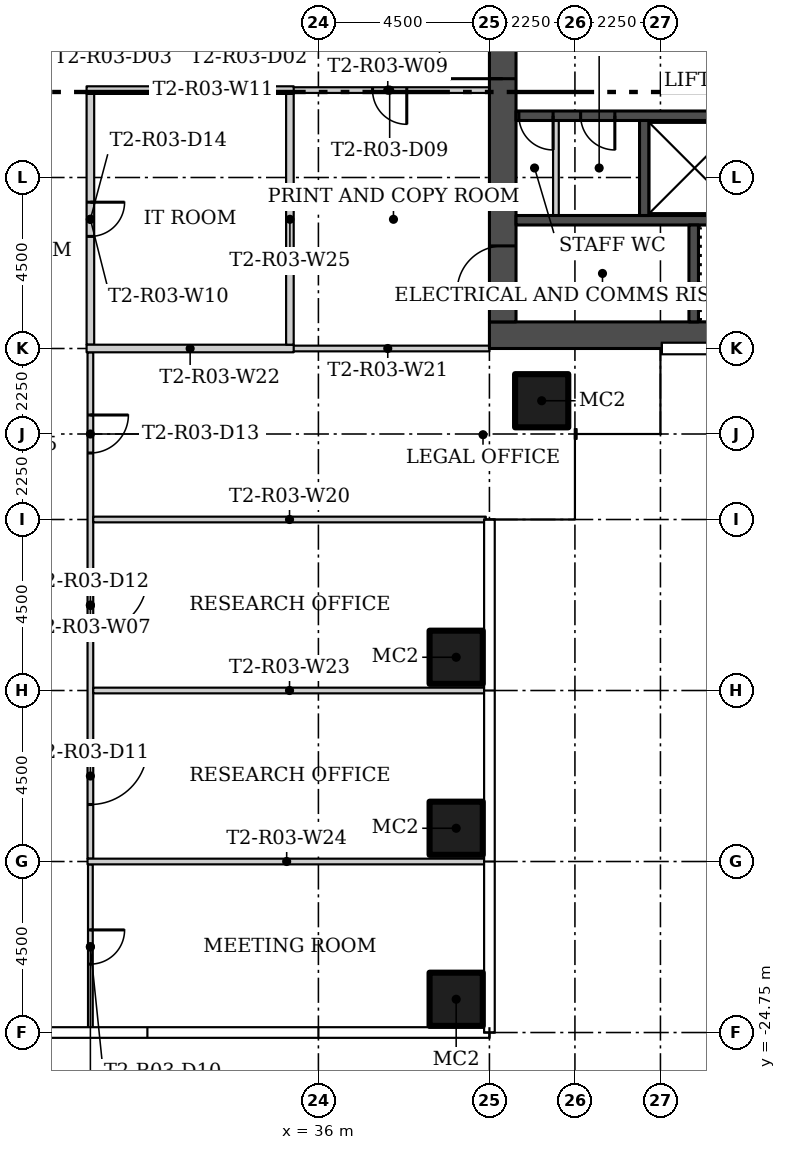
"""IFC4 building model, lengths in metres.
Left out: names, types, materials, properties, quantities, classifications, styles, units other than length and angle.
Written with IfcOpenShell. Run it as: python <this file> out.ifc"""

import sys

from ifc_helpers import new_model, si_unit, direction, frame, frame_2d, origin, origin_2d, place, context, subcontext, project, spatial, rectangle, hollow_rectangle, extrude, element, fill, save


model = new_model("IFC4")
c1 = context("Model", 3, precision=1e-05, world=origin(), true_north=direction((0.0, 1.0)))
c2 = subcontext(c1, "Body", "Model", "MODEL_VIEW")
j1 = project(units=[si_unit("LENGTHUNIT", "METRE"), si_unit("PLANEANGLEUNIT", "RADIAN")], contexts=[c1])
p1 = place(None, origin())
s1 = spatial("IfcSite", under=j1, at=p1, CompositionType="ELEMENT")
p2 = place(p1, origin())
s2 = spatial("IfcBuilding", under=s1, at=p2, CompositionType="ELEMENT")
p3 = place(p2, frame((0.0, 0.0, 42.0)))
s3 = spatial("IfcBuildingStorey", under=s2, at=p3, CompositionType="ELEMENT", Elevation=42.0)
for number, where in (
    (1, (41.875, -8.125, 0.0)),
    (2, (39.625, -14.875, 0.0)),
    (3, (39.625, -19.375, 0.0)),
    (4, (39.625, -23.875, 0.0)),
):
    element("IfcColumn", number, at=place(p3, frame(where)), inside=s3, PredefinedType="COLUMN", context=c2, shape_type="SweptSolid", body=[
        extrude(hollow_rectangle(XDim=1.4, YDim=1.4, WallThickness=0.05, at=origin_2d()), origin(), (0.0, 0.0, 1.0), 3.55),
    ])
p4 = place(p3, frame((30.0, -6.85, 0.0), z_axis=(0.0, 0.0, 1.0), x_axis=(0.0, -1.0, 0.0)))
e5 = element("IfcWall", 5, at=p4, inside=s3, PredefinedType="PARTITIONING", context=c2, shape_type="SweptSolid", body=[
    extrude(rectangle(XDim=13.325, YDim=0.15, at=frame_2d((6.663, 0.0))), origin(), (0.0, 0.0, 1.0), 3.55),
])
p5 = place(p4, frame((10.4, 0.0, 0.0)))
e6 = element("IfcOpeningElement", 6, at=p5, cuts=e5, PredefinedType="OPENING", context=c2, shape_type="SweptSolid", body=[
    extrude(rectangle(XDim=1.5, YDim=2.1, at=frame_2d((0.75, 1.05))), frame((0.0, 0.085, 0.0), z_axis=(0.0, -1.0, 0.0), x_axis=(1.0, 0.0, 0.0)), (0.0, 0.0, 1.0), 0.17),
])
p6 = place(p4, frame((5.9, 0.0, 0.0)))
e7 = element("IfcOpeningElement", 7, at=p6, cuts=e5, PredefinedType="OPENING", context=c2, shape_type="SweptSolid", body=[
    extrude(rectangle(XDim=1.5, YDim=2.1, at=frame_2d((0.75, 1.05))), frame((0.0, 0.085, 0.0), z_axis=(0.0, -1.0, 0.0), x_axis=(1.0, 0.0, 0.0)), (0.0, 0.0, 1.0), 0.17),
])
p7 = place(p4, frame((1.65, 0.0, 0.0)))
e8 = element("IfcOpeningElement", 8, at=p7, cuts=e5, PredefinedType="OPENING", context=c2, shape_type="SweptSolid", body=[
    extrude(rectangle(XDim=1.0, YDim=2.4, at=frame_2d((0.5, 1.2))), frame((0.0, 0.085, 0.0), z_axis=(0.0, -1.0, 0.0), x_axis=(1.0, 0.0, 0.0)), (0.0, 0.0, 1.0), 0.17),
])
p8 = place(p3, frame((30.0, -20.325, 0.0), z_axis=(0.0, 0.0, 1.0), x_axis=(0.0, -1.0, 0.0)))
e9 = element("IfcWall", 9, at=p8, inside=s3, PredefinedType="PARTITIONING", context=c2, shape_type="SweptSolid", body=[
    extrude(rectangle(XDim=4.33, YDim=0.125, at=frame_2d((2.165, 0.0))), origin(), (0.0, 0.0, 1.0), 3.55),
])
p9 = place(p8, frame((1.725, 0.0, 0.0)))
e10 = element("IfcOpeningElement", 10, at=p9, cuts=e9, PredefinedType="OPENING", context=c2, shape_type="SweptSolid", body=[
    extrude(rectangle(XDim=0.9, YDim=2.1, at=frame_2d((0.45, 1.05))), frame((0.0, 0.073, 0.0), z_axis=(0.0, -1.0, 0.0), x_axis=(1.0, 0.0, 0.0)), (0.0, 0.0, 1.0), 0.145),
])
p10 = place(p3, frame((40.5, 0.05, 0.0), z_axis=(0.0, 0.0, 1.0), x_axis=(-1.0, 0.0, 0.0)))
e11 = element("IfcWall", 11, at=p10, inside=s3, PredefinedType="PARTITIONING", context=c2, shape_type="SweptSolid", body=[
    extrude(rectangle(XDim=5.35, YDim=0.15, at=frame_2d((2.675, 0.0))), origin(), (0.0, 0.0, 1.0), 3.55),
])
p11 = place(p10, frame((2.175, 0.0, 0.0)))
e12 = element("IfcOpeningElement", 12, at=p11, cuts=e11, PredefinedType="OPENING", context=c2, shape_type="SweptSolid", body=[
    extrude(rectangle(XDim=0.9, YDim=2.1, at=frame_2d((0.45, 1.05))), frame((0.0, 0.085, 0.0), z_axis=(0.0, -1.0, 0.0), x_axis=(1.0, 0.0, 0.0)), (0.0, 0.0, 1.0), 0.17),
])
p12 = place(p3, frame((30.0, -0.05, 0.0), z_axis=(0.0, 0.0, 1.0), x_axis=(0.0, -1.0, 0.0)))
e13 = element("IfcWall", 13, at=p12, inside=s3, PredefinedType="PARTITIONING", context=c2, shape_type="SweptSolid", body=[
    extrude(rectangle(XDim=6.6, YDim=0.2, at=frame_2d((3.3, 0.0))), origin(), (0.0, 0.0, 1.0), 3.55),
])
p13 = place(p12, frame((2.85, 0.0, 0.0)))
e14 = element("IfcOpeningElement", 14, at=p13, cuts=e13, PredefinedType="OPENING", context=c2, shape_type="SweptSolid", body=[
    extrude(rectangle(XDim=0.9, YDim=2.1, at=frame_2d((0.45, 1.05))), frame((0.0, 0.11, 0.0), z_axis=(0.0, -1.0, 0.0), x_axis=(1.0, 0.0, 0.0)), (0.0, 0.0, 1.0), 0.22),
])
p14 = place(p3, frame((35.35, 0.05, 0.0), z_axis=(0.0, 0.0, 1.0), x_axis=(-1.0, 0.0, 0.0)))
e15 = element("IfcWall", 15, at=p14, inside=s3, PredefinedType="PARTITIONING", context=c2, shape_type="SweptSolid", body=[
    extrude(rectangle(XDim=5.45, YDim=0.2, at=frame_2d((2.725, 0.0))), origin(), (0.0, 0.0, 1.0), 3.55),
])
p15 = place(p3, frame((30.075, -11.25, 0.0)))
e16 = element("IfcWall", 16, at=p15, inside=s3, PredefinedType="PARTITIONING", context=c2, shape_type="SweptSolid", body=[
    extrude(rectangle(XDim=10.33, YDim=0.15, at=frame_2d((5.165, 0.0))), origin(), (0.0, 0.0, 1.0), 3.55),
])
p16 = place(p3, frame((40.5, -6.75, 0.0), z_axis=(0.0, 0.0, 1.0), x_axis=(-1.0, 0.0, 0.0)))
e17 = element("IfcWall", 17, at=p16, inside=s3, PredefinedType="PARTITIONING", context=c2, shape_type="SweptSolid", body=[
    extrude(rectangle(XDim=5.35, YDim=0.15, at=frame_2d((2.675, 0.0))), origin(), (0.0, 0.0, 1.0), 3.55),
])
p17 = place(p3, frame((35.35, -6.75, 0.0), z_axis=(0.0, 0.0, 1.0), x_axis=(-1.0, 0.0, 0.0)))
e18 = element("IfcWall", 18, at=p17, inside=s3, PredefinedType="PARTITIONING", context=c2, shape_type="SweptSolid", body=[
    extrude(rectangle(XDim=5.45, YDim=0.2, at=frame_2d((2.725, 0.0))), origin(), (0.0, 0.0, 1.0), 3.55),
])
p18 = place(p3, frame((30.075, -15.75, 0.0)))
e19 = element("IfcWall", 19, at=p18, inside=s3, PredefinedType="PARTITIONING", context=c2, shape_type="SweptSolid", body=[
    extrude(rectangle(XDim=10.33, YDim=0.15, at=frame_2d((5.165, 0.0))), origin(), (0.0, 0.0, 1.0), 3.55),
])
p19 = place(p3, frame((29.925, -20.25, 0.0)))
e20 = element("IfcWall", 20, at=p19, inside=s3, PredefinedType="PARTITIONING", context=c2, shape_type="SweptSolid", body=[
    extrude(rectangle(XDim=10.48, YDim=0.15, at=frame_2d((5.24, 0.0))), origin(), (0.0, 0.0, 1.0), 3.55),
])
p20 = place(p3, frame((35.25, -0.05, 0.0), z_axis=(0.0, 0.0, 1.0), x_axis=(0.0, -1.0, 0.0)))
e21 = element("IfcWall", 21, at=p20, inside=s3, PredefinedType="PARTITIONING", context=c2, shape_type="SweptSolid", body=[
    extrude(rectangle(XDim=6.6, YDim=0.2, at=frame_2d((3.3, 0.0))), origin(), (0.0, 0.0, 1.0), 3.55),
])
p21 = place(p3, frame((54.0, -6.4, 0.0), z_axis=(0.0, 0.0, 1.0), x_axis=(-1.0, 0.0, 0.0)))
e22 = element("IfcWall", 22, at=p21, inside=s3, PredefinedType="SHEAR", context=c2, shape_type="SweptSolid", body=[
    extrude(rectangle(XDim=13.5, YDim=0.7, at=frame_2d((6.75, 0.0))), origin(), (0.0, 0.0, 1.0), 3.55),
])
p22 = place(p3, frame((40.85, -6.05, 0.0), z_axis=(0.0, 0.0, 1.0), x_axis=(0.0, 1.0, 0.0)))
e23 = element("IfcWall", 23, at=p22, inside=s3, PredefinedType="SHEAR", context=c2, shape_type="SweptSolid", body=[
    extrude(rectangle(XDim=12.1, YDim=0.7, at=frame_2d((6.05, 0.0))), origin(), (0.0, 0.0, 1.0), 3.55),
])
p23 = place(p22, frame((0.8, 0.0, 0.0)))
e24 = element("IfcOpeningElement", 24, at=p23, cuts=e23, PredefinedType="OPENING", context=c2, shape_type="SweptSolid", body=[
    extrude(rectangle(XDim=1.2, YDim=2.1, at=frame_2d((0.6, 1.05))), frame((0.0, 0.36, 0.0), z_axis=(0.0, -1.0, 0.0), x_axis=(1.0, 0.0, 0.0)), (0.0, 0.0, 1.0), 0.72),
])
p24 = place(p22, frame((6.4, 0.0, 0.0)))
e25 = element("IfcOpeningElement", 25, at=p24, cuts=e23, PredefinedType="OPENING", context=c2, shape_type="SweptSolid", body=[
    extrude(rectangle(XDim=1.8, YDim=2.4, at=frame_2d((0.9, 1.2))), frame((0.0, 0.36, 0.0), z_axis=(0.0, -1.0, 0.0), x_axis=(1.0, 0.0, 0.0)), (0.0, 0.0, 1.0), 0.72),
])
p25 = place(p3, frame((53.3, -3.375, 0.0), z_axis=(0.0, 0.0, 1.0), x_axis=(-1.0, 0.0, 0.0)))
e26 = element("IfcWall", 26, at=p25, inside=s3, PredefinedType="SHEAR", context=c2, shape_type="SweptSolid", body=[
    extrude(rectangle(XDim=12.1, YDim=0.25, at=frame_2d((6.05, 0.0))), origin(), (0.0, 0.0, 1.0), 3.55),
])
p26 = place(p25, frame((0.05, 0.0, 0.0)))
e27 = element("IfcOpeningElement", 27, at=p26, cuts=e26, PredefinedType="OPENING", context=c2, shape_type="SweptSolid", body=[
    extrude(rectangle(XDim=1.1, YDim=2.1, at=frame_2d((0.55, 1.05))), frame((0.0, 0.135, 0.0), z_axis=(0.0, -1.0, 0.0), x_axis=(1.0, 0.0, 0.0)), (0.0, 0.0, 1.0), 0.27),
])
p27 = place(p3, frame((45.875, -6.05, 0.0), z_axis=(0.0, 0.0, 1.0), x_axis=(0.0, 1.0, 0.0)))
e28 = element("IfcWall", 28, at=p27, inside=s3, PredefinedType="SHEAR", context=c2, shape_type="SweptSolid", body=[
    extrude(rectangle(XDim=2.55, YDim=0.25, at=frame_2d((1.275, 0.0))), origin(), (0.0, 0.0, 1.0), 3.55),
])
p28 = place(p3, frame((53.3, -0.625, 0.0), z_axis=(0.0, 0.0, 1.0), x_axis=(-1.0, 0.0, 0.0)))
e29 = element("IfcWall", 29, at=p28, inside=s3, PredefinedType="SHEAR", context=c2, shape_type="SweptSolid", body=[
    extrude(rectangle(XDim=12.1, YDim=0.25, at=frame_2d((6.05, 0.0))), origin(), (0.0, 0.0, 1.0), 3.55),
])
p29 = place(p28, frame((2.25, 0.0, 0.0)))
e30 = element("IfcOpeningElement", 30, at=p29, cuts=e29, PredefinedType="OPENING", context=c2, shape_type="SweptSolid", body=[
    extrude(rectangle(XDim=1.2, YDim=2.1, at=frame_2d((0.6, 1.05))), frame((0.0, 0.135, 0.0), z_axis=(0.0, -1.0, 0.0), x_axis=(1.0, 0.0, 0.0)), (0.0, 0.0, 1.0), 0.27),
])
p30 = place(p28, frame((9.5, 0.0, 0.0)))
e31 = element("IfcOpeningElement", 31, at=p30, cuts=e29, PredefinedType="OPENING", context=c2, shape_type="SweptSolid", body=[
    extrude(rectangle(XDim=0.9, YDim=2.1, at=frame_2d((0.45, 1.05))), frame((0.0, 0.135, 0.0), z_axis=(0.0, -1.0, 0.0), x_axis=(1.0, 0.0, 0.0)), (0.0, 0.0, 1.0), 0.27),
])
p31 = place(p28, frame((11.125, 0.0, 0.0)))
e32 = element("IfcOpeningElement", 32, at=p31, cuts=e29, PredefinedType="OPENING", context=c2, shape_type="SweptSolid", body=[
    extrude(rectangle(XDim=0.9, YDim=2.1, at=frame_2d((0.45, 1.05))), frame((0.0, 0.135, 0.0), z_axis=(0.0, -1.0, 0.0), x_axis=(1.0, 0.0, 0.0)), (0.0, 0.0, 1.0), 0.27),
])
p32 = place(p3, frame((44.575, -3.25, 0.0), z_axis=(0.0, 0.0, 1.0), x_axis=(0.0, 1.0, 0.0)))
e33 = element("IfcWall", 33, at=p32, inside=s3, PredefinedType="SHEAR", context=c2, shape_type="SweptSolid", body=[
    extrude(rectangle(XDim=2.5, YDim=0.25, at=frame_2d((1.25, 0.0))), origin(), (0.0, 0.0, 1.0), 3.55),
])
p33 = place(p3, frame((42.25, -3.25, 0.0), z_axis=(0.0, 0.0, 1.0), x_axis=(0.0, 1.0, 0.0)))
e34 = element("IfcWall", 34, at=p33, inside=s3, PredefinedType="PARTITIONING", context=c2, shape_type="SweptSolid", body=[
    extrude(rectangle(XDim=2.5, YDim=0.15, at=frame_2d((1.25, 0.0))), origin(), (0.0, 0.0, 1.0), 3.55),
])
p34 = place(p11, origin())
e35 = element("IfcDoor", 35, at=p34, inside=s3, OperationType="SINGLE_SWING_LEFT", PredefinedType="DOOR", context=c2, shape_type="SweptSolid", body=[
    extrude(rectangle(XDim=0.9, YDim=2.1, at=frame_2d((0.45, 1.05))), frame((0.0, 0.025, 0.0), z_axis=(0.0, -1.0, 0.0), x_axis=(1.0, 0.0, 0.0)), (0.0, 0.0, 1.0), 0.05),
])
fill(e12, e35)
p35 = place(p9, origin())
e36 = element("IfcDoor", 36, at=p35, inside=s3, OperationType="SINGLE_SWING_RIGHT", PredefinedType="DOOR", context=c2, shape_type="SweptSolid", body=[
    extrude(rectangle(XDim=0.9, YDim=2.1, at=frame_2d((0.45, 1.05))), frame((0.0, 0.025, 0.0), z_axis=(0.0, -1.0, 0.0), x_axis=(1.0, 0.0, 0.0)), (0.0, 0.0, 1.0), 0.05),
])
fill(e10, e36)
p36 = place(p5, origin())
e37 = element("IfcDoor", 37, at=p36, inside=s3, OperationType="DOUBLE_DOOR_SINGLE_SWING", PredefinedType="DOOR", context=c2, shape_type="SweptSolid", body=[
    extrude(rectangle(XDim=1.5, YDim=2.1, at=frame_2d((0.75, 1.05))), frame((0.0, 0.025, 0.0), z_axis=(0.0, -1.0, 0.0), x_axis=(1.0, 0.0, 0.0)), (0.0, 0.0, 1.0), 0.05),
])
fill(e6, e37)
p37 = place(p6, origin())
e38 = element("IfcDoor", 38, at=p37, inside=s3, OperationType="DOUBLE_DOOR_SINGLE_SWING", PredefinedType="DOOR", context=c2, shape_type="SweptSolid", body=[
    extrude(rectangle(XDim=1.5, YDim=2.1, at=frame_2d((0.75, 1.05))), frame((0.0, 0.025, 0.0), z_axis=(0.0, -1.0, 0.0), x_axis=(1.0, 0.0, 0.0)), (0.0, 0.0, 1.0), 0.05),
])
fill(e7, e38)
p38 = place(p7, origin())
e39 = element("IfcDoor", 39, at=p38, inside=s3, OperationType="SINGLE_SWING_RIGHT", PredefinedType="DOOR", context=c2, shape_type="SweptSolid", body=[
    extrude(rectangle(XDim=1.0, YDim=2.4, at=frame_2d((0.5, 1.2))), frame((0.0, 0.025, 0.0), z_axis=(0.0, -1.0, 0.0), x_axis=(1.0, 0.0, 0.0)), (0.0, 0.0, 1.0), 0.05),
])
fill(e8, e39)
p39 = place(p13, origin())
e40 = element("IfcDoor", 40, at=p39, inside=s3, OperationType="SINGLE_SWING_LEFT", PredefinedType="DOOR", context=c2, shape_type="SweptSolid", body=[
    extrude(rectangle(XDim=0.9, YDim=2.1, at=frame_2d((0.45, 1.05))), frame((0.0, 0.025, 0.0), z_axis=(0.0, -1.0, 0.0), x_axis=(1.0, 0.0, 0.0)), (0.0, 0.0, 1.0), 0.05),
])
fill(e14, e40)
p40 = place(p23, origin())
e41 = element("IfcDoor", 41, at=p40, inside=s3, OperationType="SINGLE_SWING_LEFT", PredefinedType="DOOR", context=c2, shape_type="SweptSolid", body=[
    extrude(rectangle(XDim=1.2, YDim=2.1, at=frame_2d((0.6, 1.05))), frame((0.0, 0.025, 0.0), z_axis=(0.0, -1.0, 0.0), x_axis=(1.0, 0.0, 0.0)), (0.0, 0.0, 1.0), 0.05),
])
fill(e24, e41)
p41 = place(p24, origin())
e42 = element("IfcDoor", 42, at=p41, inside=s3, OperationType="DOUBLE_DOOR_SINGLE_SWING", PredefinedType="DOOR", context=c2, shape_type="SweptSolid", body=[
    extrude(rectangle(XDim=1.8, YDim=2.4, at=frame_2d((0.9, 1.2))), frame((0.0, 0.025, 0.0), z_axis=(0.0, -1.0, 0.0), x_axis=(1.0, 0.0, 0.0)), (0.0, 0.0, 1.0), 0.05),
])
fill(e25, e42)
p42 = place(p30, origin())
e43 = element("IfcDoor", 43, at=p42, inside=s3, OperationType="SINGLE_SWING_RIGHT", PredefinedType="DOOR", context=c2, shape_type="SweptSolid", body=[
    extrude(rectangle(XDim=0.9, YDim=2.1, at=frame_2d((0.45, 1.05))), frame((0.0, 0.025, 0.0), z_axis=(0.0, -1.0, 0.0), x_axis=(1.0, 0.0, 0.0)), (0.0, 0.0, 1.0), 0.05),
])
fill(e31, e43)
p43 = place(p31, origin())
e44 = element("IfcDoor", 44, at=p43, inside=s3, OperationType="SINGLE_SWING_RIGHT", PredefinedType="DOOR", context=c2, shape_type="SweptSolid", body=[
    extrude(rectangle(XDim=0.9, YDim=2.1, at=frame_2d((0.45, 1.05))), frame((0.0, 0.025, 0.0), z_axis=(0.0, -1.0, 0.0), x_axis=(1.0, 0.0, 0.0)), (0.0, 0.0, 1.0), 0.05),
])
fill(e32, e44)
save(model, sys.argv[1])
